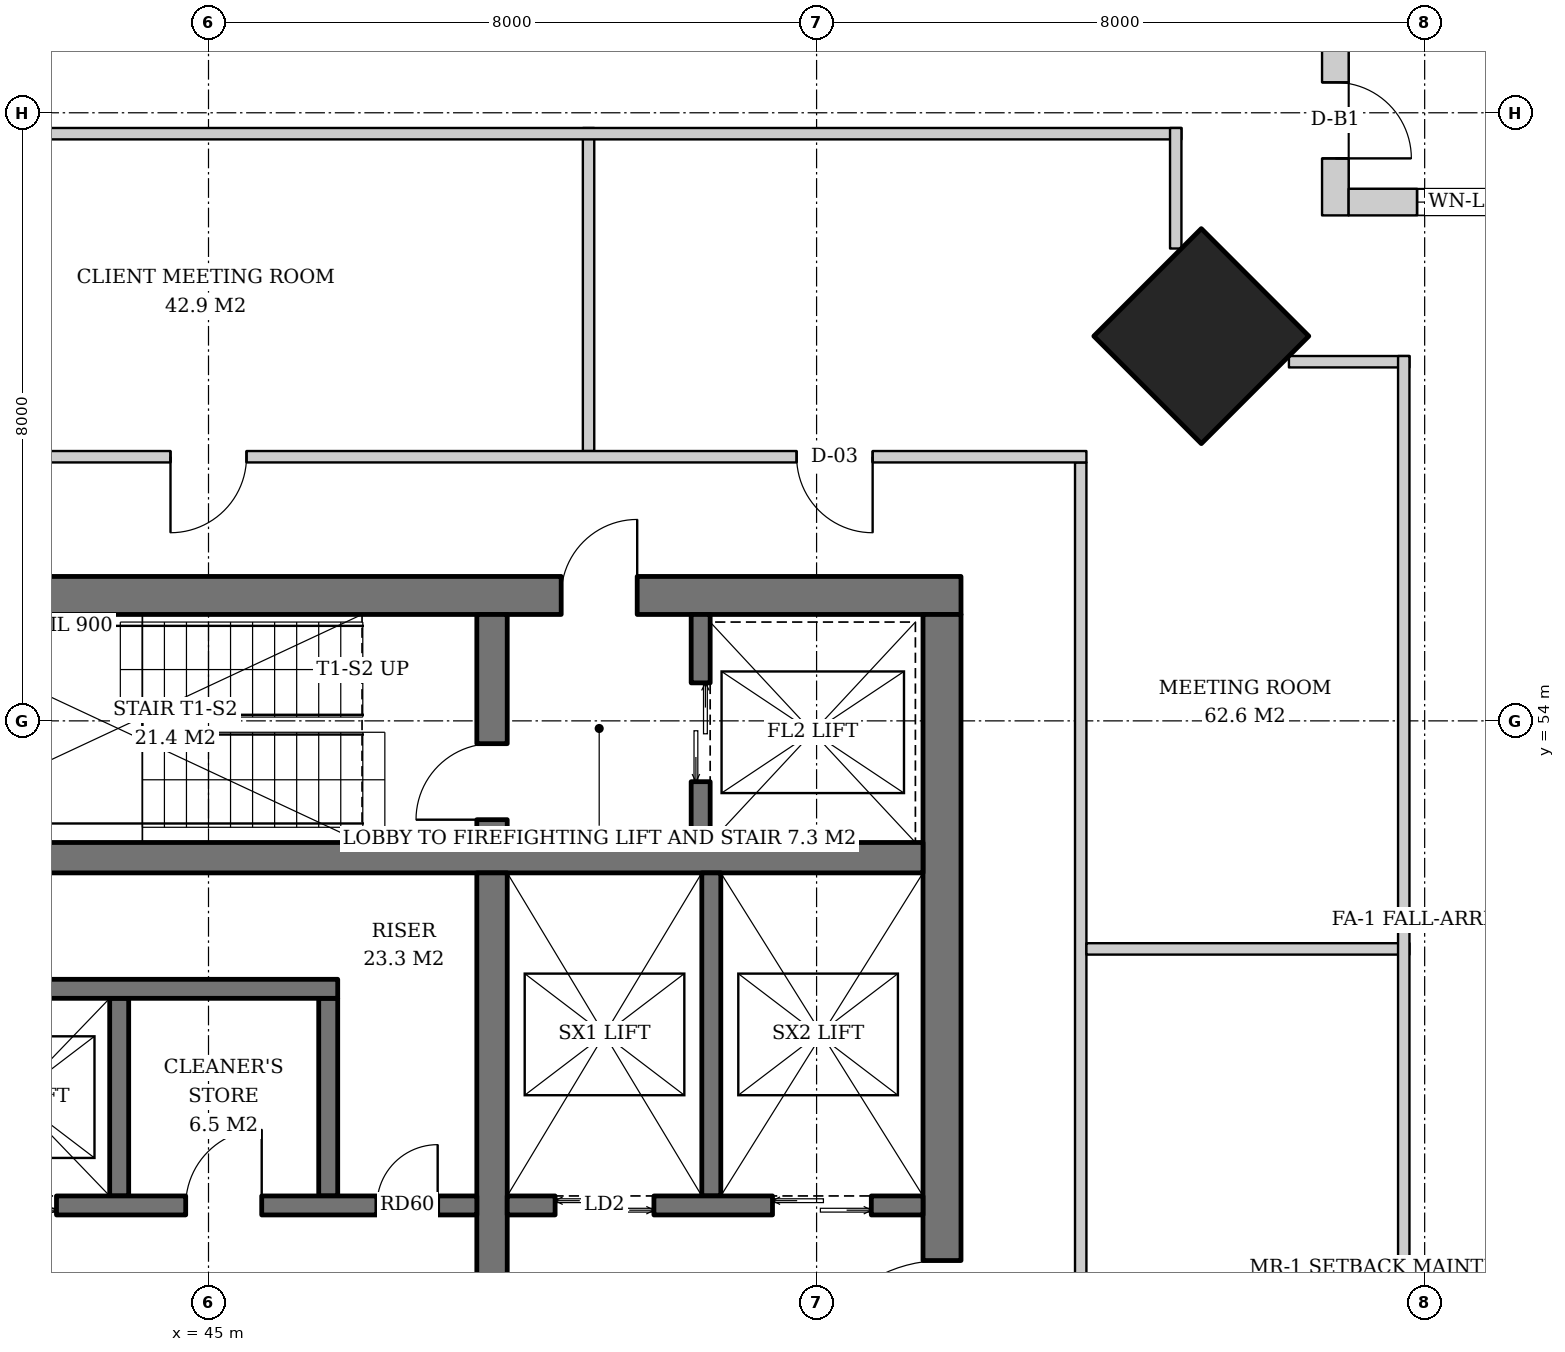
"""IFC4 building model, lengths in metres.
Left out: names, types, materials, properties, quantities, classifications, styles, units other than length and angle.
Written with IfcOpenShell. Run it as: python <this file> out.ifc"""

import sys

from ifc_helpers import new_model, si_unit, direction, frame, frame_2d, origin, origin_2d, place, context, subcontext, project, spatial, rectangle, hollow_circle, extrude, element, fill, save


model = new_model("IFC4")
c1 = context("Model", 3, precision=1e-05, world=origin(), true_north=direction((0.0, 1.0)))
c2 = subcontext(c1, "Body", "Model", "MODEL_VIEW")
j1 = project(units=[si_unit("LENGTHUNIT", "METRE"), si_unit("PLANEANGLEUNIT", "RADIAN")], contexts=[c1])
p1 = place(None, origin())
s1 = spatial("IfcSite", under=j1, at=p1, CompositionType="ELEMENT")
p2 = place(p1, origin())
s2 = spatial("IfcBuilding", under=s1, at=p2, CompositionType="ELEMENT")
p3 = place(p2, frame((0.0, 0.0, 233.8)))
s3 = spatial("IfcBuildingStorey", under=s2, at=p3, CompositionType="ELEMENT", Elevation=233.8)
p4 = place(p3, frame((58.1, 59.1, 0.0), z_axis=(-0.031962158256, -0.031962158256, 0.998977898093), x_axis=(0.707106781187, -0.707106781187, 0.0)))
e1 = element("IfcColumn", 1, at=p4, inside=s3, PredefinedType="COLUMN", context=c2, shape_type="SweptSolid", body=[
    extrude(rectangle(XDim=2.0, YDim=2.0, at=origin_2d()), origin(), (0.0, 0.0, 1.0), 3.804),
])
p5 = place(p3, frame((62.2, 60.2, 0.0), z_axis=(-0.031898107953, -0.031898107953, 0.998981992539), x_axis=(0.707106781187, -0.707106781187, 0.0)))
e2 = element("IfcColumn", 2, at=p5, inside=s3, PredefinedType="COLUMN", context=c2, shape_type="SweptSolid", body=[
    extrude(hollow_circle(Radius=0.305, WallThickness=0.025, at=origin_2d()), origin(), (0.0, 0.0, 1.0), 3.804),
])
p6 = place(p3, frame((62.2, 50.733, 0.0), z_axis=(-0.031912535354, -0.010658915229, 0.999433828532), x_axis=(0.316800238982, -0.948492281772, 0.0)))
e3 = element("IfcColumn", 3, at=p6, inside=s3, PredefinedType="COLUMN", context=c2, shape_type="SweptSolid", body=[
    extrude(hollow_circle(Radius=0.305, WallThickness=0.025, at=origin_2d()), origin(), (0.0, 0.0, 1.0), 3.802),
])
p7 = place(p3, frame((59.2, 63.2, 0.0), z_axis=(-0.031898107953, -0.031898107953, 0.998981992539), x_axis=(0.707106781187, -0.707106781187, 0.0)))
e4 = element("IfcColumn", 4, at=p7, inside=s3, PredefinedType="COLUMN", context=c2, shape_type="SweptSolid", body=[
    extrude(hollow_circle(Radius=0.305, WallThickness=0.025, at=origin_2d()), origin(), (0.0, 0.0, 1.0), 3.804),
])
p8 = place(p3, frame((49.733, 63.2, 0.0), z_axis=(-0.010658915229, -0.031912535354, 0.999433828532), x_axis=(0.948492281772, -0.316800238982, 0.0)))
e5 = element("IfcColumn", 5, at=p8, inside=s3, PredefinedType="COLUMN", context=c2, shape_type="SweptSolid", body=[
    extrude(hollow_circle(Radius=0.305, WallThickness=0.025, at=origin_2d()), origin(), (0.0, 0.0, 1.0), 3.802),
])
p9 = place(p3, frame((35.1, 55.65, 0.0), z_axis=(0.0, 0.0, 1.0), x_axis=(1.0, 0.0, 0.0)))
e6 = element("IfcWall", 6, at=p9, inside=s3, PredefinedType="SHEAR", context=c2, shape_type="SweptSolid", body=[
    extrude(rectangle(XDim=19.8, YDim=0.5, at=frame_2d((9.9, 0.0))), origin(), (0.0, 0.0, 1.0), 3.8),
])
p10 = place(p9, frame((14.54, 0.0, 0.0)))
e7 = element("IfcOpeningElement", 7, at=p10, cuts=e6, PredefinedType="OPENING", context=c2, shape_type="SweptSolid", body=[
    extrude(rectangle(XDim=1.0, YDim=2.1, at=frame_2d((0.5, 1.05))), frame((0.0, 0.26, 0.0), z_axis=(0.0, -1.0, 0.0), x_axis=(1.0, 0.0, 0.0)), (0.0, 0.0, 1.0), 0.52),
])
p11 = place(p9, frame((2.375, 0.0, 0.0)))
e8 = element("IfcOpeningElement", 8, at=p11, cuts=e6, PredefinedType="OPENING", context=c2, shape_type="SweptSolid", body=[
    extrude(rectangle(XDim=1.0, YDim=2.1, at=frame_2d((0.5, 1.05))), frame((0.0, 0.26, 0.0), z_axis=(0.0, -1.0, 0.0), x_axis=(1.0, 0.0, 0.0)), (0.0, 0.0, 1.0), 0.52),
])
p12 = place(p3, frame((54.65, 36.6, 0.0), z_axis=(0.0, 0.0, 1.0), x_axis=(0.0, 1.0, 0.0)))
e9 = element("IfcWall", 9, at=p12, inside=s3, PredefinedType="SHEAR", context=c2, shape_type="SweptSolid", body=[
    extrude(rectangle(XDim=18.8, YDim=0.5, at=frame_2d((9.4, 0.0))), origin(), (0.0, 0.0, 1.0), 3.8),
])
p13 = place(p12, frame((8.5, 0.0, 0.0)))
e10 = element("IfcOpeningElement", 10, at=p13, cuts=e9, PredefinedType="OPENING", context=c2, shape_type="SweptSolid", body=[
    extrude(rectangle(XDim=1.8, YDim=2.4, at=frame_2d((0.9, 1.2))), frame((0.0, 0.26, 0.0), z_axis=(0.0, -1.0, 0.0), x_axis=(1.0, 0.0, 0.0)), (0.0, 0.0, 1.0), 0.52),
])
p14 = place(p3, frame((35.6, 52.2, 0.0), z_axis=(0.0, 0.0, 1.0), x_axis=(1.0, 0.0, 0.0)))
e11 = element("IfcWall", 11, at=p14, inside=s3, PredefinedType="SHEAR", context=c2, shape_type="SweptSolid", body=[
    extrude(rectangle(XDim=18.8, YDim=0.4, at=frame_2d((9.4, 0.0))), origin(), (0.0, 0.0, 1.0), 3.8),
])
p15 = place(p3, frame((48.73, 40.0, 0.0), z_axis=(0.0, 0.0, 1.0), x_axis=(0.0, 1.0, 0.0)))
e12 = element("IfcWall", 12, at=p15, inside=s3, PredefinedType="SHEAR", context=c2, shape_type="SweptSolid", body=[
    extrude(rectangle(XDim=12.0, YDim=0.4, at=frame_2d((6.0, 0.0))), origin(), (0.0, 0.0, 1.0), 3.8),
])
p16 = place(p3, frame((48.73, 52.4, 0.0), z_axis=(0.0, 0.0, 1.0), x_axis=(0.0, 1.0, 0.0)))
e13 = element("IfcWall", 13, at=p16, inside=s3, PredefinedType="SHEAR", context=c2, shape_type="SweptSolid", body=[
    extrude(rectangle(XDim=3.0, YDim=0.4, at=frame_2d((1.5, 0.0))), origin(), (0.0, 0.0, 1.0), 3.8),
])
p17 = place(p16, frame((0.3, 0.0, 0.0)))
e14 = element("IfcOpeningElement", 14, at=p17, cuts=e13, PredefinedType="OPENING", context=c2, shape_type="SweptSolid", body=[
    extrude(rectangle(XDim=1.0, YDim=2.1, at=frame_2d((0.5, 1.05))), frame((0.0, 0.21, 0.0), z_axis=(0.0, -1.0, 0.0), x_axis=(1.0, 0.0, 0.0)), (0.0, 0.0, 1.0), 0.42),
])
p18 = place(p3, frame((59.825, 64.0, 0.0), z_axis=(0.0, 0.0, 1.0), x_axis=(0.0, -1.0, 0.0)))
e15 = element("IfcWall", 15, at=p18, inside=s3, PredefinedType="SOLIDWALL", context=c2, shape_type="SweptSolid", body=[
    extrude(rectangle(XDim=3.35, YDim=0.35, at=frame_2d((1.675, 0.0))), origin(), (0.0, 0.0, 1.0), 3.62),
])
p19 = place(p18, frame((1.6, 0.0, 0.0)))
e16 = element("IfcOpeningElement", 16, at=p19, cuts=e15, PredefinedType="OPENING", context=c2, shape_type="SweptSolid", body=[
    extrude(rectangle(XDim=1.0, YDim=2.4, at=frame_2d((0.5, 1.2))), frame((0.0, 0.185, 0.0), z_axis=(0.0, -1.0, 0.0), x_axis=(1.0, 0.0, 0.0)), (0.0, 0.0, 1.0), 0.37),
])
p20 = place(p3, frame((60.0, 60.825, 0.0), z_axis=(0.0, 0.0, 1.0), x_axis=(1.0, 0.0, 0.0)))
e17 = element("IfcWall", 17, at=p20, inside=s3, PredefinedType="SOLIDWALL", context=c2, shape_type="SweptSolid", body=[
    extrude(rectangle(XDim=3.0, YDim=0.35, at=frame_2d((1.5, 0.0))), origin(), (0.0, 0.0, 1.0), 3.62),
])
p21 = place(p20, frame((0.9, 0.0, 0.6)))
e18 = element("IfcOpeningElement", 18, at=p21, cuts=e17, PredefinedType="OPENING", context=c2, shape_type="SweptSolid", body=[
    extrude(rectangle(XDim=1.2, YDim=2.55, at=frame_2d((0.6, 1.275))), frame((0.0, 0.185, 0.0), z_axis=(0.0, -1.0, 0.0), x_axis=(1.0, 0.0, 0.0)), (0.0, 0.0, 1.0), 0.37),
])
p22 = place(p3, frame((51.475, 52.4, 0.0), z_axis=(0.0, 0.0, 1.0), x_axis=(0.0, 1.0, 0.0)))
e19 = element("IfcWall", 19, at=p22, inside=s3, PredefinedType="SHEAR", context=c2, shape_type="SweptSolid", body=[
    extrude(rectangle(XDim=3.0, YDim=0.25, at=frame_2d((1.5, 0.0))), origin(), (0.0, 0.0, 1.0), 3.8),
])
p23 = place(p22, frame((0.8, 0.0, 0.0)))
e20 = element("IfcOpeningElement", 20, at=p23, cuts=e19, PredefinedType="OPENING", context=c2, shape_type="SweptSolid", body=[
    extrude(rectangle(XDim=1.3, YDim=2.2, at=frame_2d((0.65, 1.1))), frame((0.0, 0.135, 0.0), z_axis=(0.0, -1.0, 0.0), x_axis=(1.0, 0.0, 0.0)), (0.0, 0.0, 1.0), 0.27),
])
for number, where, z_axis, x_axis in (
    (21, (43.825, 47.75, 0.0), (0.0, 0.0, 1.0), (0.0, 1.0, 0.0)),
    (22, (46.575, 47.75, 0.0), (0.0, 0.0, 1.0), (0.0, 1.0, 0.0)),
):
    element("IfcWall", number, at=place(p3, frame(where, z_axis=z_axis, x_axis=x_axis)), inside=s3, PredefinedType="SHEAR", context=c2, shape_type="SweptSolid", body=[
        extrude(rectangle(XDim=2.6, YDim=0.25, at=frame_2d((1.3, 0.0))), origin(), (0.0, 0.0, 1.0), 3.8),
    ])
p24 = place(p3, frame((35.6, 50.475, 0.0), z_axis=(0.0, 0.0, 1.0), x_axis=(1.0, 0.0, 0.0)))
e23 = element("IfcWall", 23, at=p24, inside=s3, PredefinedType="SHEAR", context=c2, shape_type="SweptSolid", body=[
    extrude(rectangle(XDim=11.1, YDim=0.25, at=frame_2d((5.55, 0.0))), origin(), (0.0, 0.0, 1.0), 3.8),
])
p25 = place(p3, frame((35.6, 47.625, 0.0), z_axis=(0.0, 0.0, 1.0), x_axis=(1.0, 0.0, 0.0)))
e24 = element("IfcWall", 24, at=p25, inside=s3, PredefinedType="SHEAR", context=c2, shape_type="SweptSolid", body=[
    extrude(rectangle(XDim=12.93, YDim=0.25, at=frame_2d((6.465, 0.0))), origin(), (0.0, 0.0, 1.0), 3.8),
])
p26 = place(p25, frame((0.75, 0.0, 0.0)))
e25 = element("IfcOpeningElement", 25, at=p26, cuts=e24, PredefinedType="OPENING", context=c2, shape_type="SweptSolid", body=[
    extrude(rectangle(XDim=1.1, YDim=2.2, at=frame_2d((0.55, 1.1))), frame((0.0, 0.135, 0.0), z_axis=(0.0, -1.0, 0.0), x_axis=(1.0, 0.0, 0.0)), (0.0, 0.0, 1.0), 0.27),
])
p27 = place(p25, frame((3.55, 0.0, 0.0)))
e26 = element("IfcOpeningElement", 26, at=p27, cuts=e24, PredefinedType="OPENING", context=c2, shape_type="SweptSolid", body=[
    extrude(rectangle(XDim=1.1, YDim=2.2, at=frame_2d((0.55, 1.1))), frame((0.0, 0.135, 0.0), z_axis=(0.0, -1.0, 0.0), x_axis=(1.0, 0.0, 0.0)), (0.0, 0.0, 1.0), 0.27),
])
p28 = place(p25, frame((6.3, 0.0, 0.0)))
e27 = element("IfcOpeningElement", 27, at=p28, cuts=e24, PredefinedType="OPENING", context=c2, shape_type="SweptSolid", body=[
    extrude(rectangle(XDim=1.1, YDim=2.2, at=frame_2d((0.55, 1.1))), frame((0.0, 0.135, 0.0), z_axis=(0.0, -1.0, 0.0), x_axis=(1.0, 0.0, 0.0)), (0.0, 0.0, 1.0), 0.27),
])
p29 = place(p25, frame((9.1, 0.0, 0.0)))
e28 = element("IfcOpeningElement", 28, at=p29, cuts=e24, PredefinedType="OPENING", context=c2, shape_type="SweptSolid", body=[
    extrude(rectangle(XDim=1.0, YDim=2.1, at=frame_2d((0.5, 1.05))), frame((0.0, 0.135, 0.0), z_axis=(0.0, -1.0, 0.0), x_axis=(1.0, 0.0, 0.0)), (0.0, 0.0, 1.0), 0.27),
])
p30 = place(p25, frame((11.615, 0.0, 0.0)))
e29 = element("IfcOpeningElement", 29, at=p30, cuts=e24, PredefinedType="OPENING", context=c2, shape_type="SweptSolid", body=[
    extrude(rectangle(XDim=0.8, YDim=2.0, at=frame_2d((0.4, 1.0))), frame((0.0, 0.135, 0.0), z_axis=(0.0, -1.0, 0.0), x_axis=(1.0, 0.0, 0.0)), (0.0, 0.0, 1.0), 0.27),
])
p31 = place(p3, frame((51.615, 47.75, 0.0), z_axis=(0.0, 0.0, 1.0), x_axis=(0.0, 1.0, 0.0)))
e30 = element("IfcWall", 30, at=p31, inside=s3, PredefinedType="SHEAR", context=c2, shape_type="SweptSolid", body=[
    extrude(rectangle(XDim=4.25, YDim=0.25, at=frame_2d((2.125, 0.0))), origin(), (0.0, 0.0, 1.0), 3.8),
])
p32 = place(p3, frame((48.93, 47.625, 0.0), z_axis=(0.0, 0.0, 1.0), x_axis=(1.0, 0.0, 0.0)))
e31 = element("IfcWall", 31, at=p32, inside=s3, PredefinedType="SHEAR", context=c2, shape_type="SweptSolid", body=[
    extrude(rectangle(XDim=5.47, YDim=0.25, at=frame_2d((2.735, 0.0))), origin(), (0.0, 0.0, 1.0), 3.8),
])
p33 = place(p32, frame((0.63, 0.0, 0.0)))
e32 = element("IfcOpeningElement", 32, at=p33, cuts=e31, PredefinedType="OPENING", context=c2, shape_type="SweptSolid", body=[
    extrude(rectangle(XDim=1.3, YDim=2.2, at=frame_2d((0.65, 1.1))), frame((0.0, 0.135, 0.0), z_axis=(0.0, -1.0, 0.0), x_axis=(1.0, 0.0, 0.0)), (0.0, 0.0, 1.0), 0.27),
])
p34 = place(p32, frame((3.49, 0.0, 0.0)))
e33 = element("IfcOpeningElement", 33, at=p34, cuts=e31, PredefinedType="OPENING", context=c2, shape_type="SweptSolid", body=[
    extrude(rectangle(XDim=1.3, YDim=2.2, at=frame_2d((0.65, 1.1))), frame((0.0, 0.135, 0.0), z_axis=(0.0, -1.0, 0.0), x_axis=(1.0, 0.0, 0.0)), (0.0, 0.0, 1.0), 0.27),
])
p35 = place(p3, frame((56.475, 34.45, 0.0), z_axis=(0.0, 0.0, 1.0), x_axis=(0.0, 1.0, 0.0)))
e34 = element("IfcWall", 34, at=p35, inside=s3, PredefinedType="PARTITIONING", context=c2, shape_type="SweptSolid", body=[
    extrude(rectangle(XDim=22.95, YDim=0.15, at=frame_2d((11.475, 0.0))), origin(), (0.0, 0.0, 1.0), 3.02),
])
p36 = place(p35, frame((7.413, 0.0, 0.0)))
e35 = element("IfcOpeningElement", 35, at=p36, cuts=e34, PredefinedType="OPENING", context=c2, shape_type="SweptSolid", body=[
    extrude(rectangle(XDim=1.8, YDim=2.4, at=frame_2d((0.9, 1.2))), frame((0.0, 0.085, 0.0), z_axis=(0.0, -1.0, 0.0), x_axis=(1.0, 0.0, 0.0)), (0.0, 0.0, 1.0), 0.17),
])
for number, where, z_axis, x_axis in (
    (36, (56.55, 51.0, 0.0), (0.0, 0.0, 1.0), (1.0, 0.0, 0.0)),
    (37, (50.0, 57.55, 0.0), (0.0, 0.0, 1.0), (0.0, 1.0, 0.0)),
):
    element("IfcWall", number, at=place(p3, frame(where, z_axis=z_axis, x_axis=x_axis)), inside=s3, PredefinedType="PARTITIONING", context=c2, shape_type="SweptSolid", body=[
        extrude(rectangle(XDim=4.25, YDim=0.15, at=frame_2d((2.125, 0.0))), origin(), (0.0, 0.0, 1.0), 3.62),
    ])
p37 = place(p3, frame((56.55, 57.475, 0.0), z_axis=(0.0, 0.0, 1.0), x_axis=(-1.0, 0.0, 0.0)))
e38 = element("IfcWall", 38, at=p37, inside=s3, PredefinedType="PARTITIONING", context=c2, shape_type="SweptSolid", body=[
    extrude(rectangle(XDim=22.95, YDim=0.15, at=frame_2d((11.475, 0.0))), origin(), (0.0, 0.0, 1.0), 3.02),
])
p38 = place(p37, frame((2.812, 0.0, 0.0)))
e39 = element("IfcOpeningElement", 39, at=p38, cuts=e38, PredefinedType="OPENING", context=c2, shape_type="SweptSolid", body=[
    extrude(rectangle(XDim=1.0, YDim=2.1, at=frame_2d((0.5, 1.05))), frame((0.0, 0.085, 0.0), z_axis=(0.0, -1.0, 0.0), x_axis=(1.0, 0.0, 0.0)), (0.0, 0.0, 1.0), 0.17),
])
p39 = place(p37, frame((11.05, 0.0, 0.0)))
e40 = element("IfcOpeningElement", 40, at=p39, cuts=e38, PredefinedType="OPENING", context=c2, shape_type="SweptSolid", body=[
    extrude(rectangle(XDim=1.0, YDim=2.1, at=frame_2d((0.5, 1.05))), frame((0.0, 0.085, 0.0), z_axis=(0.0, -1.0, 0.0), x_axis=(1.0, 0.0, 0.0)), (0.0, 0.0, 1.0), 0.17),
])
p40 = place(p3, frame((32.2, 61.725, 0.0), z_axis=(0.0, 0.0, 1.0), x_axis=(1.0, 0.0, 0.0)))
e41 = element("IfcWall", 41, at=p40, inside=s3, PredefinedType="PARTITIONING", context=c2, shape_type="SweptSolid", body=[
    extrude(rectangle(XDim=25.6, YDim=0.15, at=frame_2d((12.8, 0.0))), origin(), (0.0, 0.0, 1.0), 3.02),
])
for number, where, z_axis, x_axis in (
    (42, (57.725, 61.8, 0.0), (0.0, 0.0, 1.0), (0.0, -1.0, 0.0)),
    (43, (59.214, 58.725, 0.0), (0.0, 0.0, 1.0), (1.0, 0.0, 0.0)),
):
    element("IfcWall", number, at=place(p3, frame(where, z_axis=z_axis, x_axis=x_axis)), inside=s3, PredefinedType="PARTITIONING", context=c2, shape_type="SweptSolid", body=[
        extrude(rectangle(XDim=1.586, YDim=0.15, at=frame_2d((0.793, 0.0))), origin(), (0.0, 0.0, 1.0), 3.62),
    ])
p41 = place(p3, frame((60.725, 58.8, 0.0), z_axis=(0.0, 0.0, 1.0), x_axis=(0.0, -1.0, 0.0)))
e44 = element("IfcWall", 44, at=p41, inside=s3, PredefinedType="PARTITIONING", context=c2, shape_type="SweptSolid", body=[
    extrude(rectangle(XDim=25.6, YDim=0.15, at=frame_2d((12.8, 0.0))), origin(), (0.0, 0.0, 1.0), 3.02),
])
p42 = place(p19, origin())
e45 = element("IfcDoor", 45, at=p42, inside=s3, OperationType="SINGLE_SWING_RIGHT", PredefinedType="DOOR", context=c2, shape_type="SweptSolid", body=[
    extrude(rectangle(XDim=1.0, YDim=2.4, at=frame_2d((0.5, 1.2))), frame((0.0, 0.025, 0.0), z_axis=(0.0, -1.0, 0.0), x_axis=(1.0, 0.0, 0.0)), (0.0, 0.0, 1.0), 0.05),
])
fill(e16, e45)
p43 = place(p21, origin())
e46 = element("IfcWindow", 46, at=p43, inside=s3, PartitioningType="SINGLE_PANEL", PredefinedType="WINDOW", context=c2, shape_type="SweptSolid", body=[
    extrude(rectangle(XDim=1.2, YDim=2.55, at=frame_2d((0.6, 1.275))), frame((0.0, 0.03, 0.0), z_axis=(0.0, -1.0, 0.0), x_axis=(1.0, 0.0, 0.0)), (0.0, 0.0, 1.0), 0.06),
])
fill(e18, e46)
p44 = place(p23, origin())
e47 = element("IfcDoor", 47, at=p44, inside=s3, OperationType="DOUBLE_DOOR_SLIDING", PredefinedType="DOOR", context=c2, shape_type="SweptSolid", body=[
    extrude(rectangle(XDim=1.3, YDim=2.2, at=frame_2d((0.65, 1.1))), frame((0.0, 0.025, 0.0), z_axis=(0.0, -1.0, 0.0), x_axis=(1.0, 0.0, 0.0)), (0.0, 0.0, 1.0), 0.05),
])
fill(e20, e47)
p45 = place(p28, origin())
e48 = element("IfcDoor", 48, at=p45, inside=s3, OperationType="DOUBLE_DOOR_SLIDING", PredefinedType="DOOR", context=c2, shape_type="SweptSolid", body=[
    extrude(rectangle(XDim=1.1, YDim=2.2, at=frame_2d((0.55, 1.1))), frame((0.0, 0.025, 0.0), z_axis=(0.0, -1.0, 0.0), x_axis=(1.0, 0.0, 0.0)), (0.0, 0.0, 1.0), 0.05),
])
fill(e27, e48)
p46 = place(p29, origin())
e49 = element("IfcDoor", 49, at=p46, inside=s3, OperationType="SINGLE_SWING_RIGHT", PredefinedType="DOOR", context=c2, shape_type="SweptSolid", body=[
    extrude(rectangle(XDim=1.0, YDim=2.1, at=frame_2d((0.5, 1.05))), frame((0.0, 0.025, 0.0), z_axis=(0.0, -1.0, 0.0), x_axis=(1.0, 0.0, 0.0)), (0.0, 0.0, 1.0), 0.05),
])
fill(e28, e49)
p47 = place(p30, origin())
e50 = element("IfcDoor", 50, at=p47, inside=s3, OperationType="SINGLE_SWING_RIGHT", PredefinedType="DOOR", context=c2, shape_type="SweptSolid", body=[
    extrude(rectangle(XDim=0.8, YDim=2.0, at=frame_2d((0.4, 1.0))), frame((0.0, 0.025, 0.0), z_axis=(0.0, -1.0, 0.0), x_axis=(1.0, 0.0, 0.0)), (0.0, 0.0, 1.0), 0.05),
])
fill(e29, e50)
p48 = place(p33, origin())
e51 = element("IfcDoor", 51, at=p48, inside=s3, OperationType="DOUBLE_DOOR_SLIDING", PredefinedType="DOOR", context=c2, shape_type="SweptSolid", body=[
    extrude(rectangle(XDim=1.3, YDim=2.2, at=frame_2d((0.65, 1.1))), frame((0.0, 0.025, 0.0), z_axis=(0.0, -1.0, 0.0), x_axis=(1.0, 0.0, 0.0)), (0.0, 0.0, 1.0), 0.05),
])
fill(e32, e51)
p49 = place(p34, origin())
e52 = element("IfcDoor", 52, at=p49, inside=s3, OperationType="DOUBLE_DOOR_SLIDING", PredefinedType="DOOR", context=c2, shape_type="SweptSolid", body=[
    extrude(rectangle(XDim=1.3, YDim=2.2, at=frame_2d((0.65, 1.1))), frame((0.0, 0.025, 0.0), z_axis=(0.0, -1.0, 0.0), x_axis=(1.0, 0.0, 0.0)), (0.0, 0.0, 1.0), 0.05),
])
fill(e33, e52)
p50 = place(p17, origin())
e53 = element("IfcDoor", 53, at=p50, inside=s3, OperationType="SINGLE_SWING_LEFT", PredefinedType="DOOR", context=c2, shape_type="SweptSolid", body=[
    extrude(rectangle(XDim=1.0, YDim=2.1, at=frame_2d((0.5, 1.05))), frame((0.0, 0.025, 0.0), z_axis=(0.0, -1.0, 0.0), x_axis=(1.0, 0.0, 0.0)), (0.0, 0.0, 1.0), 0.05),
])
fill(e14, e53)
p51 = place(p10, origin())
e54 = element("IfcDoor", 54, at=p51, inside=s3, OperationType="SINGLE_SWING_RIGHT", PredefinedType="DOOR", context=c2, shape_type="SweptSolid", body=[
    extrude(rectangle(XDim=1.0, YDim=2.1, at=frame_2d((0.5, 1.05))), frame((0.0, 0.025, 0.0), z_axis=(0.0, -1.0, 0.0), x_axis=(1.0, 0.0, 0.0)), (0.0, 0.0, 1.0), 0.05),
])
fill(e7, e54)
p52 = place(p13, origin())
e55 = element("IfcDoor", 55, at=p52, inside=s3, OperationType="DOUBLE_DOOR_SINGLE_SWING", PredefinedType="DOOR", context=c2, shape_type="SweptSolid", body=[
    extrude(rectangle(XDim=1.8, YDim=2.4, at=frame_2d((0.9, 1.2))), frame((0.0, 0.025, 0.0), z_axis=(0.0, -1.0, 0.0), x_axis=(1.0, 0.0, 0.0)), (0.0, 0.0, 1.0), 0.05),
])
fill(e10, e55)
p53 = place(p38, origin())
e56 = element("IfcDoor", 56, at=p53, inside=s3, OperationType="SINGLE_SWING_LEFT", PredefinedType="DOOR", context=c2, shape_type="SweptSolid", body=[
    extrude(rectangle(XDim=1.0, YDim=2.1, at=frame_2d((0.5, 1.05))), frame((0.0, 0.025, 0.0), z_axis=(0.0, -1.0, 0.0), x_axis=(1.0, 0.0, 0.0)), (0.0, 0.0, 1.0), 0.05),
])
fill(e39, e56)
p54 = place(p39, origin())
e57 = element("IfcDoor", 57, at=p54, inside=s3, OperationType="SINGLE_SWING_RIGHT", PredefinedType="DOOR", context=c2, shape_type="SweptSolid", body=[
    extrude(rectangle(XDim=1.0, YDim=2.1, at=frame_2d((0.5, 1.05))), frame((0.0, 0.025, 0.0), z_axis=(0.0, -1.0, 0.0), x_axis=(1.0, 0.0, 0.0)), (0.0, 0.0, 1.0), 0.05),
])
fill(e40, e57)
save(model, sys.argv[1])
